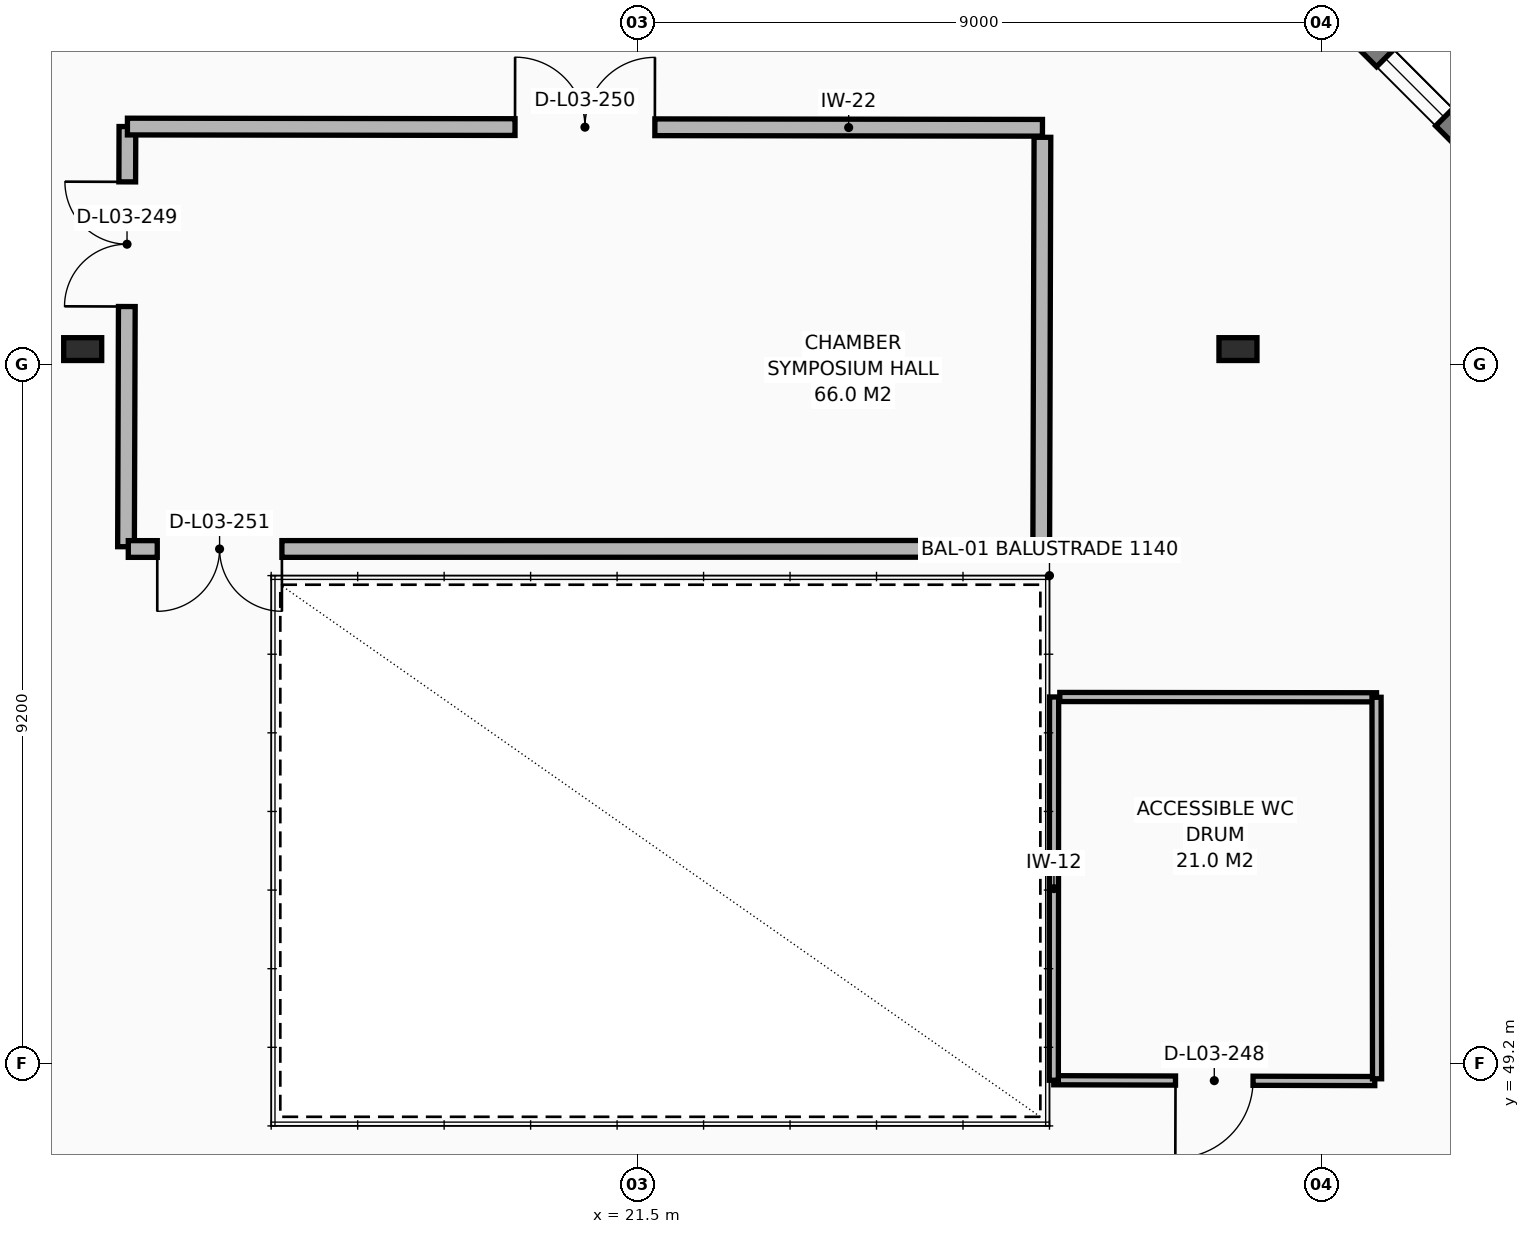
"""IFC4 building model, lengths in metres.
Left out: names, types, materials, properties, quantities, classifications, styles, units other than length and angle.
Written with IfcOpenShell. Run it as: python <this file> out.ifc"""

import sys

from ifc_helpers import new_model, si_unit, direction, frame, frame_2d, origin, origin_2d, place, context, subcontext, project, spatial, rectangle, i_section, extrude, element, fill, save


model = new_model("IFC4")
c1 = context("Model", 3, precision=1e-05, world=origin(), true_north=direction((0.0, 1.0)))
c2 = subcontext(c1, "Body", "Model", "MODEL_VIEW")
j1 = project(units=[si_unit("LENGTHUNIT", "METRE"), si_unit("PLANEANGLEUNIT", "RADIAN")], contexts=[c1])
p1 = place(None, origin())
s1 = spatial("IfcSite", under=j1, at=p1, CompositionType="ELEMENT")
p2 = place(p1, origin())
s2 = spatial("IfcBuilding", under=s1, at=p2, CompositionType="ELEMENT")
p3 = place(p2, frame((0.0, 0.0, 13.68)))
s3 = spatial("IfcBuildingStorey", under=s2, at=p3, CompositionType="ELEMENT", Elevation=13.68)
for number, where, z_axis, x_axis in (
    (1, (29.4, 58.6, 0.0), (0.0, 0.0, 1.0), (1.0, 0.0, 0.0)),
    (2, (14.2, 58.6, 0.0), (0.0, 0.0, 1.0), (1.0, 0.0, 0.0)),
):
    element("IfcColumn", number, at=place(p3, frame(where, z_axis=z_axis, x_axis=x_axis)), inside=s3, PredefinedType="COLUMN", context=c2, shape_type="SweptSolid", body=[
        extrude(i_section(OverallWidth=0.3, OverallDepth=0.5, WebThickness=0.014, FlangeThickness=0.028, FilletRadius=0.027, at=origin_2d()), origin(), (0.0, 0.0, 1.0), 4.44),
    ])
p4 = place(p3, frame((30.355, 63.409, 0.0), z_axis=(0.0, 0.0, 1.0), x_axis=(0.707075293342, -0.707138267629, 0.0)))
e3 = element("IfcWall", 3, at=p4, inside=s3, PredefinedType="SOLIDWALL", context=c2, shape_type="SweptSolid", body=[
    extrude(rectangle(XDim=3.877, YDim=0.32, at=frame_2d((1.938, 0.0))), origin(), (0.0, 0.0, 1.0), 3.76),
])
p5 = place(p4, frame((1.388, 0.0, 1.05)))
e4 = element("IfcOpeningElement", 4, at=p5, cuts=e3, PredefinedType="OPENING", context=c2, shape_type="SweptSolid", body=[
    extrude(rectangle(XDim=1.1, YDim=1.3, at=frame_2d((0.55, 0.65))), frame((0.0, 0.17, 0.0), z_axis=(0.0, -1.0, 0.0), x_axis=(1.0, 0.0, 0.0)), (0.0, 0.0, 1.0), 0.34),
])
p6 = place(p3, frame((31.2, 48.97, 0.0), z_axis=(0.0, 0.0, 1.0), x_axis=(-0.999996616228, 0.002601448013, 0.0)))
e5 = element("IfcWall", 5, at=p6, inside=s3, PredefinedType="PARTITIONING", context=c2, shape_type="SweptSolid", body=[
    extrude(rectangle(XDim=4.223, YDim=0.12, at=frame_2d((2.112, 0.0))), origin(), (0.0, 0.0, 1.0), 3.75),
])
p7 = place(p6, frame((1.602, 0.0, 0.0)))
e6 = element("IfcOpeningElement", 6, at=p7, cuts=e5, PredefinedType="OPENING", context=c2, shape_type="SweptSolid", body=[
    extrude(rectangle(XDim=1.02, YDim=2.12, at=frame_2d((0.51, 1.06))), frame((0.0, 0.07, 0.0), z_axis=(0.0, -1.0, 0.0), x_axis=(1.0, 0.0, 0.0)), (0.0, 0.0, 1.0), 0.14),
])
p8 = place(p3, frame((26.977, 48.981, 0.0), z_axis=(0.0, 0.0, 1.0), x_axis=(0.000823124691, 0.999999661233, 0.0)))
e7 = element("IfcWall", 7, at=p8, inside=s3, PredefinedType="PARTITIONING", context=c2, shape_type="SweptSolid", body=[
    extrude(rectangle(XDim=5.042, YDim=0.12, at=frame_2d((2.521, 0.0))), origin(), (0.0, 0.0, 1.0), 3.75),
])
p9 = place(p3, frame((27.056, 54.023, 0.0), z_axis=(0.0, 0.0, 1.0), x_axis=(0.999999504035, -0.00099595709, 0.0)))
e8 = element("IfcWall", 8, at=p9, inside=s3, PredefinedType="PARTITIONING", context=c2, shape_type="SweptSolid", body=[
    extrude(rectangle(XDim=4.167, YDim=0.12, at=frame_2d((2.083, 0.0))), origin(), (0.0, 0.0, 1.0), 3.75),
])
p10 = place(p3, frame((31.223, 54.019, 0.0), z_axis=(0.0, 0.0, 1.0), x_axis=(0.001361998931, -0.999999072479, 0.0)))
e9 = element("IfcWall", 9, at=p10, inside=s3, PredefinedType="PARTITIONING", context=c2, shape_type="SweptSolid", body=[
    extrude(rectangle(XDim=5.019, YDim=0.12, at=frame_2d((2.51, 0.0))), origin(), (0.0, 0.0, 1.0), 3.75),
])
p11 = place(p3, frame((14.77, 56.0, 0.0), z_axis=(0.0, 0.0, 1.0), x_axis=(0.003356723282, 0.999994366189, 0.0)))
e10 = element("IfcWall", 10, at=p11, inside=s3, PredefinedType="PARTITIONING", context=c2, shape_type="SweptSolid", body=[
    extrude(rectangle(XDim=5.528, YDim=0.22, at=frame_2d((2.764, 0.0))), origin(), (0.0, 0.0, 1.0), 3.75),
])
p12 = place(p11, frame((3.16, 0.0, 0.0)))
e11 = element("IfcOpeningElement", 11, at=p12, cuts=e10, PredefinedType="OPENING", context=c2, shape_type="SweptSolid", body=[
    extrude(rectangle(XDim=1.64, YDim=2.2, at=frame_2d((0.82, 1.1))), frame((0.0, 0.12, 0.0), z_axis=(0.0, -1.0, 0.0), x_axis=(1.0, 0.0, 0.0)), (0.0, 0.0, 1.0), 0.24),
])
p13 = place(p3, frame((14.789, 61.528, 0.0), z_axis=(0.0, 0.0, 1.0), x_axis=(0.999999104322, -0.001338415414, 0.0)))
e12 = element("IfcWall", 12, at=p13, inside=s3, PredefinedType="PARTITIONING", context=c2, shape_type="SweptSolid", body=[
    extrude(rectangle(XDim=12.039, YDim=0.22, at=frame_2d((6.02, 0.0))), origin(), (0.0, 0.0, 1.0), 3.75),
])
p14 = place(p13, frame((5.1, 0.0, 0.0)))
e13 = element("IfcOpeningElement", 13, at=p14, cuts=e12, PredefinedType="OPENING", context=c2, shape_type="SweptSolid", body=[
    extrude(rectangle(XDim=1.84, YDim=2.22, at=frame_2d((0.92, 1.11))), frame((0.0, 0.12, 0.0), z_axis=(0.0, -1.0, 0.0), x_axis=(1.0, 0.0, 0.0)), (0.0, 0.0, 1.0), 0.24),
])
p15 = place(p3, frame((26.827, 61.386, 0.0), z_axis=(0.0, 0.0, 1.0), x_axis=(-0.00293108409, -0.999995704364, 0.0)))
e14 = element("IfcWall", 14, at=p15, inside=s3, PredefinedType="PARTITIONING", context=c2, shape_type="SweptSolid", body=[
    extrude(rectangle(XDim=5.414, YDim=0.22, at=frame_2d((2.707, 0.0))), origin(), (0.0, 0.0, 1.0), 3.75),
])
p16 = place(p3, frame((26.812, 55.972, 0.0), z_axis=(0.0, 0.0, 1.0), x_axis=(-0.999999979343, -0.00020325616, 0.0)))
e15 = element("IfcWall", 15, at=p16, inside=s3, PredefinedType="PARTITIONING", context=c2, shape_type="SweptSolid", body=[
    extrude(rectangle(XDim=12.011, YDim=0.22, at=frame_2d((6.006, 0.0))), origin(), (0.0, 0.0, 1.0), 3.75),
])
p17 = place(p16, frame((9.99, 0.0, 0.0)))
e16 = element("IfcOpeningElement", 16, at=p17, cuts=e15, PredefinedType="OPENING", context=c2, shape_type="SweptSolid", body=[
    extrude(rectangle(XDim=1.64, YDim=2.2, at=frame_2d((0.82, 1.1))), frame((0.0, 0.12, 0.0), z_axis=(0.0, -1.0, 0.0), x_axis=(1.0, 0.0, 0.0)), (0.0, 0.0, 1.0), 0.24),
])
p18 = place(p5, origin())
e17 = element("IfcWindow", 17, at=p18, inside=s3, PartitioningType="SINGLE_PANEL", PredefinedType="WINDOW", context=c2, shape_type="SweptSolid", body=[
    extrude(rectangle(XDim=1.1, YDim=1.3, at=frame_2d((0.55, 0.65))), frame((0.0, 0.03, 0.0), z_axis=(0.0, -1.0, 0.0), x_axis=(1.0, 0.0, 0.0)), (0.0, 0.0, 1.0), 0.06),
])
fill(e4, e17)
p19 = place(p7, origin())
e18 = element("IfcDoor", 18, at=p19, inside=s3, OperationType="SINGLE_SWING_RIGHT", PredefinedType="DOOR", context=c2, shape_type="SweptSolid", body=[
    extrude(rectangle(XDim=1.02, YDim=2.12, at=frame_2d((0.51, 1.06))), frame((0.0, 0.025, 0.0), z_axis=(0.0, -1.0, 0.0), x_axis=(1.0, 0.0, 0.0)), (0.0, 0.0, 1.0), 0.05),
])
fill(e6, e18)
p20 = place(p12, origin())
e19 = element("IfcDoor", 19, at=p20, inside=s3, OperationType="DOUBLE_DOOR_SINGLE_SWING", PredefinedType="DOOR", context=c2, shape_type="SweptSolid", body=[
    extrude(rectangle(XDim=1.64, YDim=2.2, at=frame_2d((0.82, 1.1))), frame((0.0, 0.025, 0.0), z_axis=(0.0, -1.0, 0.0), x_axis=(1.0, 0.0, 0.0)), (0.0, 0.0, 1.0), 0.05),
])
fill(e11, e19)
p21 = place(p14, origin())
e20 = element("IfcDoor", 20, at=p21, inside=s3, OperationType="DOUBLE_DOOR_SINGLE_SWING", PredefinedType="DOOR", context=c2, shape_type="SweptSolid", body=[
    extrude(rectangle(XDim=1.84, YDim=2.22, at=frame_2d((0.92, 1.11))), frame((0.0, 0.025, 0.0), z_axis=(0.0, -1.0, 0.0), x_axis=(1.0, 0.0, 0.0)), (0.0, 0.0, 1.0), 0.05),
])
fill(e13, e20)
p22 = place(p17, origin())
e21 = element("IfcDoor", 21, at=p22, inside=s3, OperationType="DOUBLE_DOOR_SINGLE_SWING", PredefinedType="DOOR", context=c2, shape_type="SweptSolid", body=[
    extrude(rectangle(XDim=1.64, YDim=2.2, at=frame_2d((0.82, 1.1))), frame((0.0, 0.025, 0.0), z_axis=(0.0, -1.0, 0.0), x_axis=(1.0, 0.0, 0.0)), (0.0, 0.0, 1.0), 0.05),
])
fill(e16, e21)
save(model, sys.argv[1])
